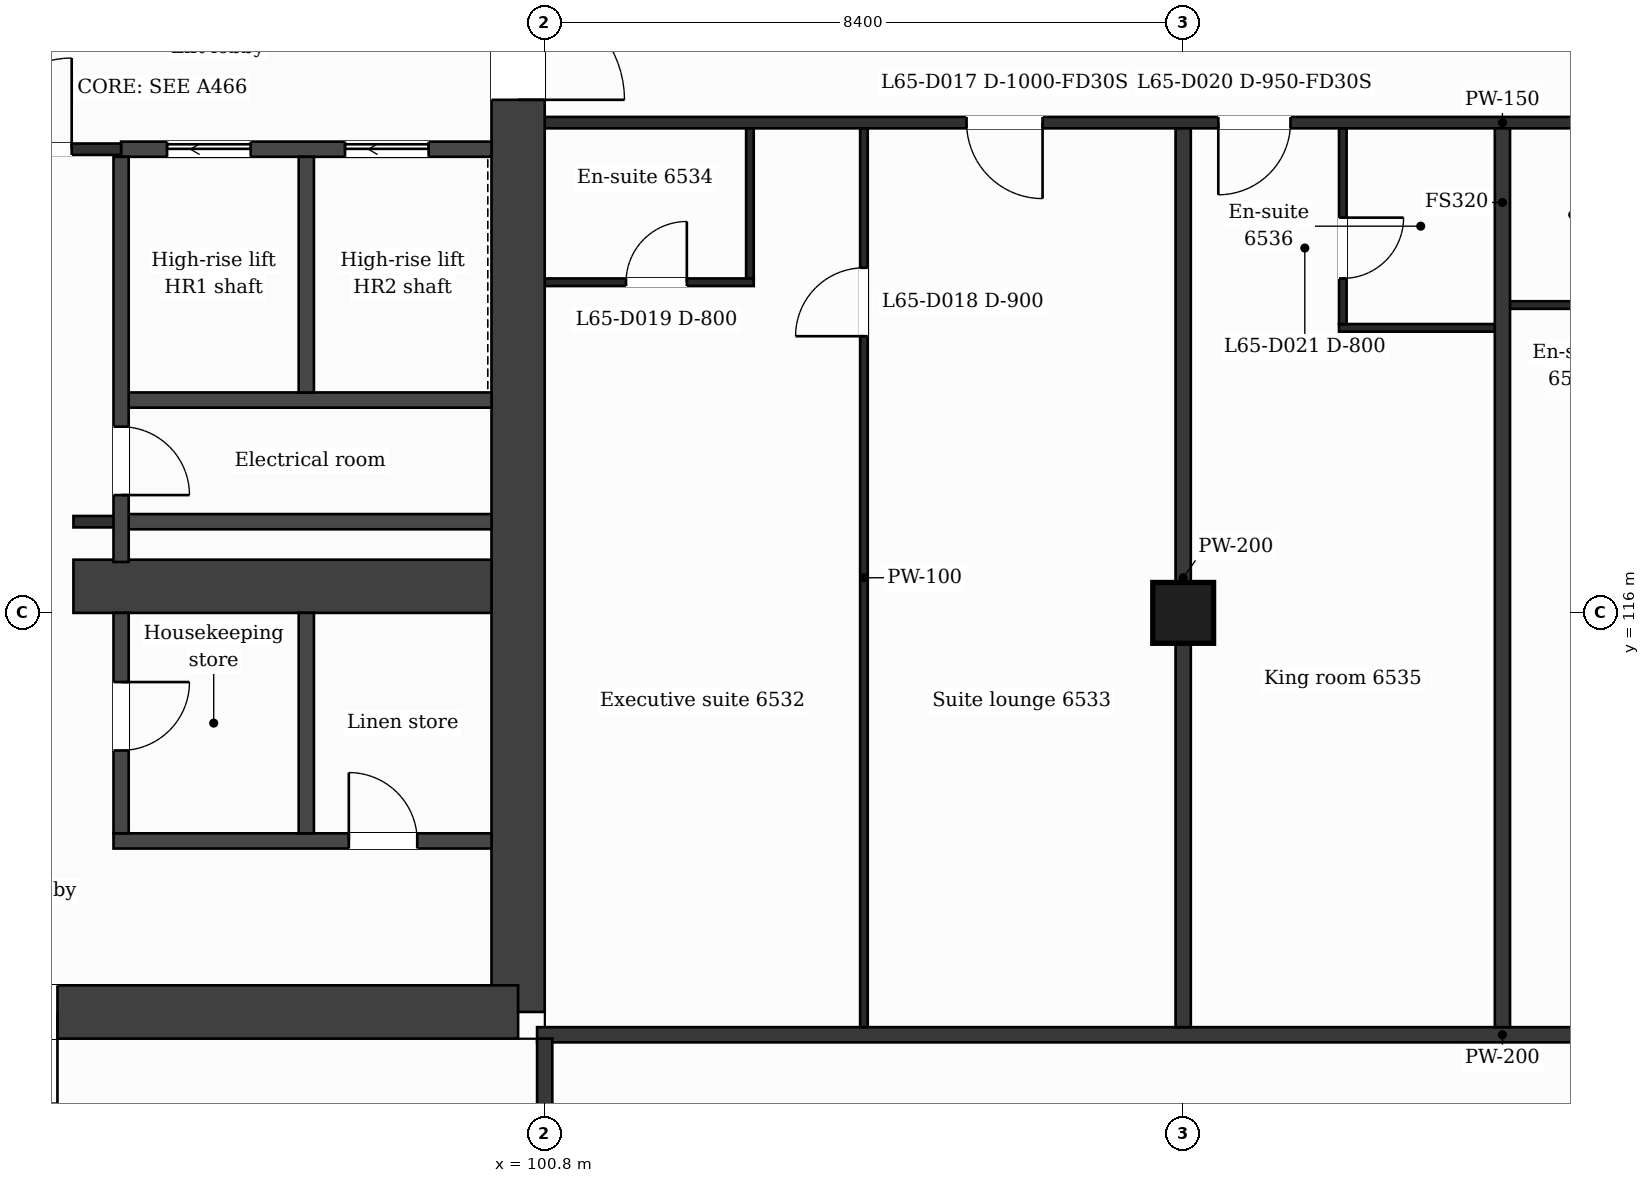
"""IFC4 building model, lengths in metres.
Left out: names, types, materials, properties, quantities, classifications, styles, units other than length and angle.
Written with IfcOpenShell. Run it as: python <this file> out.ifc"""

import sys

from ifc_helpers import new_model, si_unit, direction, frame, frame_2d, origin, origin_2d, place, context, subcontext, project, spatial, rectangle, extrude, element, fill, save


model = new_model("IFC4")
c1 = context("Model", 3, precision=1e-05, world=origin(), true_north=direction((0.0, 1.0)))
c2 = subcontext(c1, "Body", "Model", "MODEL_VIEW")
j1 = project(units=[si_unit("LENGTHUNIT", "METRE"), si_unit("PLANEANGLEUNIT", "RADIAN")], contexts=[c1])
p1 = place(None, origin())
s1 = spatial("IfcSite", under=j1, at=p1, CompositionType="ELEMENT")
p2 = place(p1, origin())
s2 = spatial("IfcBuilding", under=s1, at=p2, CompositionType="ELEMENT")
p3 = place(p2, frame((0.0, 0.0, 270.1)))
s3 = spatial("IfcBuildingStorey", under=s2, at=p3, CompositionType="ELEMENT", Elevation=270.1)
p4 = place(p3, frame((100.45, 132.05, 0.0), z_axis=(0.0, 0.0, 1.0), x_axis=(0.0, -1.0, 0.0)))
e1 = element("IfcWall", 1, at=p4, inside=s3, PredefinedType="SHEAR", context=c2, shape_type="SweptSolid", body=[
    extrude(rectangle(XDim=21.3, YDim=0.7, at=frame_2d((10.65, 0.0))), origin(), (0.0, 0.0, 1.0), 3.7),
])
p5 = place(p4, frame((7.9, 0.0, 0.0)))
e2 = element("IfcOpeningElement", 2, at=p5, cuts=e1, PredefinedType="OPENING", context=c2, shape_type="SweptSolid", body=[
    extrude(rectangle(XDim=1.4, YDim=2.1, at=frame_2d((0.7, 1.05))), frame((0.0, 0.36, 0.0), z_axis=(0.0, -1.0, 0.0), x_axis=(1.0, 0.0, 0.0)), (0.0, 0.0, 1.0), 0.72),
])
p6 = place(p3, frame((100.45, 110.75, 0.0), z_axis=(0.0, 0.0, 1.0), x_axis=(-1.0, 0.0, 0.0)))
e3 = element("IfcWall", 3, at=p6, inside=s3, PredefinedType="SHEAR", context=c2, shape_type="SweptSolid", body=[
    extrude(rectangle(XDim=14.38, YDim=0.7, at=frame_2d((7.19, 0.0))), origin(), (0.0, 0.0, 1.0), 3.7),
])
p7 = place(p6, frame((6.06, 0.0, 0.0)))
e4 = element("IfcOpeningElement", 4, at=p7, cuts=e3, PredefinedType="OPENING", context=c2, shape_type="SweptSolid", body=[
    extrude(rectangle(XDim=1.2, YDim=2.1, at=frame_2d((0.6, 1.05))), frame((0.0, 0.36, 0.0), z_axis=(0.0, -1.0, 0.0), x_axis=(1.0, 0.0, 0.0)), (0.0, 0.0, 1.0), 0.72),
])
p8 = place(p3, frame((94.6, 116.35, 0.0), z_axis=(0.0, 0.0, 1.0), x_axis=(1.0, 0.0, 0.0)))
e5 = element("IfcWall", 5, at=p8, inside=s3, PredefinedType="SHEAR", context=c2, shape_type="SweptSolid", body=[
    extrude(rectangle(XDim=5.5, YDim=0.7, at=frame_2d((2.75, 0.0))), origin(), (0.0, 0.0, 1.0), 3.7),
])
p9 = place(p3, frame((109.2, 116.0, 0.0), z_axis=(0.0, 0.0, 1.0), x_axis=(1.0, 0.0, 0.0)))
e6 = element("IfcColumn", 6, at=p9, inside=s3, PredefinedType="COLUMN", context=c2, shape_type="SweptSolid", body=[
    extrude(rectangle(XDim=0.8, YDim=0.8, at=origin_2d()), origin(), (0.0, 0.0, 1.0), 3.7),
])
p10 = place(p3, frame((100.7, 110.45, 0.0), z_axis=(0.0, 0.0, 1.0), x_axis=(1.0, 0.0, 0.0)))
e7 = element("IfcWall", 7, at=p10, inside=s3, PredefinedType="PARTITIONING", context=c2, shape_type="SweptSolid", body=[
    extrude(rectangle(XDim=25.4, YDim=0.2, at=frame_2d((12.7, 0.0))), origin(), (0.0, 0.0, 1.0), 3.38),
])
p11 = place(p3, frame((95.127, 113.0, 0.0), z_axis=(0.0, 0.0, 1.0), x_axis=(1.0, 0.0, 0.0)))
e8 = element("IfcWall", 8, at=p11, inside=s3, PredefinedType="PARTITIONING", context=c2, shape_type="SweptSolid", body=[
    extrude(rectangle(XDim=4.973, YDim=0.2, at=frame_2d((2.487, 0.0))), origin(), (0.0, 0.0, 1.0), 3.38),
])
p12 = place(p11, frame((3.096, 0.0, 0.0)))
e9 = element("IfcOpeningElement", 9, at=p12, cuts=e8, PredefinedType="OPENING", context=c2, shape_type="SweptSolid", body=[
    extrude(rectangle(XDim=0.9, YDim=2.1, at=frame_2d((0.45, 1.05))), frame((0.0, 0.11, 0.0), z_axis=(0.0, -1.0, 0.0), x_axis=(1.0, 0.0, 0.0)), (0.0, 0.0, 1.0), 0.22),
])
p13 = place(p3, frame((95.227, 117.2, 0.0), z_axis=(0.0, 0.0, 1.0), x_axis=(1.0, 0.0, 0.0)))
e10 = element("IfcWall", 10, at=p13, inside=s3, PredefinedType="PARTITIONING", context=c2, shape_type="SweptSolid", body=[
    extrude(rectangle(XDim=4.873, YDim=0.2, at=frame_2d((2.437, 0.0))), origin(), (0.0, 0.0, 1.0), 3.38),
])
p14 = place(p3, frame((94.6, 117.2, 0.0), z_axis=(0.0, 0.0, 1.0), x_axis=(1.0, 0.0, 0.0)))
e11 = element("IfcWall", 11, at=p14, inside=s3, PredefinedType="PARTITIONING", context=c2, shape_type="SweptSolid", body=[
    extrude(rectangle(XDim=0.627, YDim=0.15, at=frame_2d((0.313, 0.0))), origin(), (0.0, 0.0, 1.0), 3.38),
])
p15 = place(p3, frame((95.227, 118.8, 0.0), z_axis=(0.0, 0.0, 1.0), x_axis=(1.0, 0.0, 0.0)))
e12 = element("IfcWall", 12, at=p15, inside=s3, PredefinedType="PARTITIONING", context=c2, shape_type="SweptSolid", body=[
    extrude(rectangle(XDim=4.873, YDim=0.2, at=frame_2d((2.437, 0.0))), origin(), (0.0, 0.0, 1.0), 3.38),
])
p16 = place(p3, frame((111.25, 119.75, 0.0), z_axis=(0.0, 0.0, 1.0), x_axis=(1.0, 0.0, 0.0)))
e13 = element("IfcWall", 13, at=p16, inside=s3, PredefinedType="PARTITIONING", context=c2, shape_type="SweptSolid", body=[
    extrude(rectangle(XDim=2.15, YDim=0.1, at=frame_2d((1.075, 0.0))), origin(), (0.0, 0.0, 1.0), 3.38),
])
p17 = place(p3, frame((113.4, 120.05, 0.0), z_axis=(0.0, 0.0, 1.0), x_axis=(1.0, 0.0, 0.0)))
e14 = element("IfcWall", 14, at=p17, inside=s3, PredefinedType="PARTITIONING", context=c2, shape_type="SweptSolid", body=[
    extrude(rectangle(XDim=1.85, YDim=0.1, at=frame_2d((0.925, 0.0))), origin(), (0.0, 0.0, 1.0), 3.38),
])
p18 = place(p3, frame((100.8, 120.35, 0.0), z_axis=(0.0, 0.0, 1.0), x_axis=(1.0, 0.0, 0.0)))
e15 = element("IfcWall", 15, at=p18, inside=s3, PredefinedType="PARTITIONING", context=c2, shape_type="SweptSolid", body=[
    extrude(rectangle(XDim=2.75, YDim=0.1, at=frame_2d((1.375, 0.0))), origin(), (0.0, 0.0, 1.0), 3.38),
])
p19 = place(p18, frame((1.07, 0.0, 0.0)))
e16 = element("IfcOpeningElement", 16, at=p19, cuts=e15, PredefinedType="OPENING", context=c2, shape_type="SweptSolid", body=[
    extrude(rectangle(XDim=0.8, YDim=2.1, at=frame_2d((0.4, 1.05))), frame((0.0, 0.06, 0.0), z_axis=(0.0, -1.0, 0.0), x_axis=(1.0, 0.0, 0.0)), (0.0, 0.0, 1.0), 0.12),
])
p20 = place(p3, frame((95.227, 122.1, 0.0), z_axis=(0.0, 0.0, 1.0), x_axis=(1.0, 0.0, 0.0)))
e17 = element("IfcWall", 17, at=p20, inside=s3, PredefinedType="PARTITIONING", context=c2, shape_type="SweptSolid", body=[
    extrude(rectangle(XDim=4.873, YDim=0.2, at=frame_2d((2.437, 0.0))), origin(), (0.0, 0.0, 1.0), 3.38),
])
p21 = place(p20, frame((0.605, 0.0, 0.0)))
e18 = element("IfcOpeningElement", 18, at=p21, cuts=e17, PredefinedType="OPENING", context=c2, shape_type="SweptSolid", body=[
    extrude(rectangle(XDim=1.1, YDim=2.1, at=frame_2d((0.55, 1.05))), frame((0.0, 0.11, 0.0), z_axis=(0.0, -1.0, 0.0), x_axis=(1.0, 0.0, 0.0)), (0.0, 0.0, 1.0), 0.22),
])
p22 = place(p20, frame((2.946, 0.0, 0.0)))
e19 = element("IfcOpeningElement", 19, at=p22, cuts=e17, PredefinedType="OPENING", context=c2, shape_type="SweptSolid", body=[
    extrude(rectangle(XDim=1.1, YDim=2.1, at=frame_2d((0.55, 1.05))), frame((0.0, 0.11, 0.0), z_axis=(0.0, -1.0, 0.0), x_axis=(1.0, 0.0, 0.0)), (0.0, 0.0, 1.0), 0.22),
])
p23 = place(p3, frame((92.827, 122.1, 0.0), z_axis=(0.0, 0.0, 1.0), x_axis=(1.0, 0.0, 0.0)))
e20 = element("IfcWall", 20, at=p23, inside=s3, PredefinedType="PARTITIONING", context=c2, shape_type="SweptSolid", body=[
    extrude(rectangle(XDim=2.4, YDim=0.15, at=frame_2d((1.2, 0.0))), origin(), (0.0, 0.0, 1.0), 3.38),
])
p24 = place(p23, frame((0.55, 0.0, 0.0)))
e21 = element("IfcOpeningElement", 21, at=p24, cuts=e20, PredefinedType="OPENING", context=c2, shape_type="SweptSolid", body=[
    extrude(rectangle(XDim=1.2, YDim=2.1, at=frame_2d((0.6, 1.05))), frame((0.0, 0.085, 0.0), z_axis=(0.0, -1.0, 0.0), x_axis=(1.0, 0.0, 0.0)), (0.0, 0.0, 1.0), 0.17),
])
p25 = place(p3, frame((100.8, 122.45, 0.0), z_axis=(0.0, 0.0, 1.0), x_axis=(1.0, 0.0, 0.0)))
e22 = element("IfcWall", 22, at=p25, inside=s3, PredefinedType="PARTITIONING", context=c2, shape_type="SweptSolid", body=[
    extrude(rectangle(XDim=25.2, YDim=0.15, at=frame_2d((12.6, 0.0))), origin(), (0.0, 0.0, 1.0), 3.38),
])
p26 = place(p25, frame((5.55, 0.0, 0.0)))
e23 = element("IfcOpeningElement", 23, at=p26, cuts=e22, PredefinedType="OPENING", context=c2, shape_type="SweptSolid", body=[
    extrude(rectangle(XDim=1.0, YDim=2.1, at=frame_2d((0.5, 1.05))), frame((0.0, 0.085, 0.0), z_axis=(0.0, -1.0, 0.0), x_axis=(1.0, 0.0, 0.0)), (0.0, 0.0, 1.0), 0.17),
])
p27 = place(p25, frame((8.862, 0.0, 0.0)))
e24 = element("IfcOpeningElement", 24, at=p27, cuts=e22, PredefinedType="OPENING", context=c2, shape_type="SweptSolid", body=[
    extrude(rectangle(XDim=0.95, YDim=2.1, at=frame_2d((0.475, 1.05))), frame((0.0, 0.085, 0.0), z_axis=(0.0, -1.0, 0.0), x_axis=(1.0, 0.0, 0.0)), (0.0, 0.0, 1.0), 0.17),
])
p28 = place(p25, frame((15.2, 0.0, 0.0)))
e25 = element("IfcOpeningElement", 25, at=p28, cuts=e22, PredefinedType="OPENING", context=c2, shape_type="SweptSolid", body=[
    extrude(rectangle(XDim=0.95, YDim=2.1, at=frame_2d((0.475, 1.05))), frame((0.0, 0.085, 0.0), z_axis=(0.0, -1.0, 0.0), x_axis=(1.0, 0.0, 0.0)), (0.0, 0.0, 1.0), 0.17),
])
p29 = place(p25, frame((17.325, 0.0, 0.0)))
e26 = element("IfcOpeningElement", 26, at=p29, cuts=e22, PredefinedType="OPENING", context=c2, shape_type="SweptSolid", body=[
    extrude(rectangle(XDim=1.0, YDim=2.1, at=frame_2d((0.5, 1.05))), frame((0.0, 0.085, 0.0), z_axis=(0.0, -1.0, 0.0), x_axis=(1.0, 0.0, 0.0)), (0.0, 0.0, 1.0), 0.17),
])
p30 = place(p25, frame((23.862, 0.0, 0.0)))
e27 = element("IfcOpeningElement", 27, at=p30, cuts=e22, PredefinedType="OPENING", context=c2, shape_type="SweptSolid", body=[
    extrude(rectangle(XDim=0.95, YDim=2.1, at=frame_2d((0.475, 1.05))), frame((0.0, 0.085, 0.0), z_axis=(0.0, -1.0, 0.0), x_axis=(1.0, 0.0, 0.0)), (0.0, 0.0, 1.0), 0.17),
])
p31 = place(p3, frame((95.227, 113.1, 0.0), z_axis=(0.0, 0.0, 1.0), x_axis=(0.0, 1.0, 0.0)))
e28 = element("IfcWall", 28, at=p31, inside=s3, PredefinedType="PARTITIONING", context=c2, shape_type="SweptSolid", body=[
    extrude(rectangle(XDim=2.9, YDim=0.2, at=frame_2d((1.45, 0.0))), origin(), (0.0, 0.0, 1.0), 3.38),
])
p32 = place(p31, frame((1.09, 0.0, 0.0)))
e29 = element("IfcOpeningElement", 29, at=p32, cuts=e28, PredefinedType="OPENING", context=c2, shape_type="SweptSolid", body=[
    extrude(rectangle(XDim=0.9, YDim=2.1, at=frame_2d((0.45, 1.05))), frame((0.0, 0.11, 0.0), z_axis=(0.0, -1.0, 0.0), x_axis=(1.0, 0.0, 0.0)), (0.0, 0.0, 1.0), 0.22),
])
p33 = place(p3, frame((95.227, 116.67, 0.0), z_axis=(0.0, 0.0, 1.0), x_axis=(0.0, 1.0, 0.0)))
e30 = element("IfcWall", 30, at=p33, inside=s3, PredefinedType="PARTITIONING", context=c2, shape_type="SweptSolid", body=[
    extrude(rectangle(XDim=5.33, YDim=0.2, at=frame_2d((2.665, 0.0))), origin(), (0.0, 0.0, 1.0), 3.38),
])
p34 = place(p33, frame((0.88, 0.0, 0.0)))
e31 = element("IfcOpeningElement", 31, at=p34, cuts=e30, PredefinedType="OPENING", context=c2, shape_type="SweptSolid", body=[
    extrude(rectangle(XDim=0.9, YDim=2.1, at=frame_2d((0.45, 1.05))), frame((0.0, 0.11, 0.0), z_axis=(0.0, -1.0, 0.0), x_axis=(1.0, 0.0, 0.0)), (0.0, 0.0, 1.0), 0.22),
])
p35 = place(p3, frame((97.664, 113.1, 0.0), z_axis=(0.0, 0.0, 1.0), x_axis=(0.0, 1.0, 0.0)))
e32 = element("IfcWall", 32, at=p35, inside=s3, PredefinedType="PARTITIONING", context=c2, shape_type="SweptSolid", body=[
    extrude(rectangle(XDim=2.9, YDim=0.2, at=frame_2d((1.45, 0.0))), origin(), (0.0, 0.0, 1.0), 3.38),
])
p36 = place(p3, frame((97.664, 118.9, 0.0), z_axis=(0.0, 0.0, 1.0), x_axis=(0.0, 1.0, 0.0)))
e33 = element("IfcWall", 33, at=p36, inside=s3, PredefinedType="PARTITIONING", context=c2, shape_type="SweptSolid", body=[
    extrude(rectangle(XDim=3.1, YDim=0.2, at=frame_2d((1.55, 0.0))), origin(), (0.0, 0.0, 1.0), 3.38),
])
p37 = place(p3, frame((100.8, 108.79, 0.0), z_axis=(0.0, 0.0, 1.0), x_axis=(0.0, 1.0, 0.0)))
e34 = element("IfcWall", 34, at=p37, inside=s3, PredefinedType="PARTITIONING", context=c2, shape_type="SweptSolid", body=[
    extrude(rectangle(XDim=1.61, YDim=0.2, at=frame_2d((0.805, 0.0))), origin(), (0.0, 0.0, 1.0), 3.38),
])
p38 = place(p3, frame((103.5, 120.4, 0.0), z_axis=(0.0, 0.0, 1.0), x_axis=(0.0, 1.0, 0.0)))
e35 = element("IfcWall", 35, at=p38, inside=s3, PredefinedType="PARTITIONING", context=c2, shape_type="SweptSolid", body=[
    extrude(rectangle(XDim=1.975, YDim=0.1, at=frame_2d((0.988, 0.0))), origin(), (0.0, 0.0, 1.0), 3.38),
])
p39 = place(p3, frame((105.0, 110.55, 0.0), z_axis=(0.0, 0.0, 1.0), x_axis=(0.0, 1.0, 0.0)))
e36 = element("IfcWall", 36, at=p39, inside=s3, PredefinedType="PARTITIONING", context=c2, shape_type="SweptSolid", body=[
    extrude(rectangle(XDim=11.825, YDim=0.1, at=frame_2d((5.913, 0.0))), origin(), (0.0, 0.0, 1.0), 3.38),
])
p40 = place(p39, frame((9.09, 0.0, 0.0)))
e37 = element("IfcOpeningElement", 37, at=p40, cuts=e36, PredefinedType="OPENING", context=c2, shape_type="SweptSolid", body=[
    extrude(rectangle(XDim=0.9, YDim=2.1, at=frame_2d((0.45, 1.05))), frame((0.0, 0.06, 0.0), z_axis=(0.0, -1.0, 0.0), x_axis=(1.0, 0.0, 0.0)), (0.0, 0.0, 1.0), 0.12),
])
p41 = place(p3, frame((109.2, 110.55, 0.0), z_axis=(0.0, 0.0, 1.0), x_axis=(0.0, 1.0, 0.0)))
e38 = element("IfcWall", 38, at=p41, inside=s3, PredefinedType="PARTITIONING", context=c2, shape_type="SweptSolid", body=[
    extrude(rectangle(XDim=11.825, YDim=0.2, at=frame_2d((5.913, 0.0))), origin(), (0.0, 0.0, 1.0), 3.38),
])
p42 = place(p3, frame((111.3, 119.8, 0.0), z_axis=(0.0, 0.0, 1.0), x_axis=(0.0, 1.0, 0.0)))
e39 = element("IfcWall", 39, at=p42, inside=s3, PredefinedType="PARTITIONING", context=c2, shape_type="SweptSolid", body=[
    extrude(rectangle(XDim=2.575, YDim=0.1, at=frame_2d((1.288, 0.0))), origin(), (0.0, 0.0, 1.0), 3.38),
])
p43 = place(p42, frame((0.6, 0.0, 0.0)))
e40 = element("IfcOpeningElement", 40, at=p43, cuts=e39, PredefinedType="OPENING", context=c2, shape_type="SweptSolid", body=[
    extrude(rectangle(XDim=0.8, YDim=2.1, at=frame_2d((0.4, 1.05))), frame((0.0, 0.06, 0.0), z_axis=(0.0, -1.0, 0.0), x_axis=(1.0, 0.0, 0.0)), (0.0, 0.0, 1.0), 0.12),
])
p44 = place(p3, frame((113.4, 110.55, 0.0), z_axis=(0.0, 0.0, 1.0), x_axis=(0.0, 1.0, 0.0)))
e41 = element("IfcWall", 41, at=p44, inside=s3, PredefinedType="PARTITIONING", context=c2, shape_type="SweptSolid", body=[
    extrude(rectangle(XDim=11.825, YDim=0.2, at=frame_2d((5.913, 0.0))), origin(), (0.0, 0.0, 1.0), 3.38),
])
p45 = place(p24, origin())
e42 = element("IfcDoor", 42, at=p45, inside=s3, OperationType="SINGLE_SWING_RIGHT", PredefinedType="DOOR", context=c2, shape_type="SweptSolid", body=[
    extrude(rectangle(XDim=1.2, YDim=2.1, at=frame_2d((0.6, 1.05))), frame((0.0, 0.025, 0.0), z_axis=(0.0, -1.0, 0.0), x_axis=(1.0, 0.0, 0.0)), (0.0, 0.0, 1.0), 0.05),
])
fill(e21, e42)
p46 = place(p21, origin())
e43 = element("IfcDoor", 43, at=p46, inside=s3, OperationType="SLIDING_TO_LEFT", PredefinedType="DOOR", context=c2, shape_type="SweptSolid", body=[
    extrude(rectangle(XDim=1.1, YDim=2.1, at=frame_2d((0.55, 1.05))), frame((0.0, 0.025, 0.0), z_axis=(0.0, -1.0, 0.0), x_axis=(1.0, 0.0, 0.0)), (0.0, 0.0, 1.0), 0.05),
])
fill(e18, e43)
p47 = place(p22, origin())
e44 = element("IfcDoor", 44, at=p47, inside=s3, OperationType="SLIDING_TO_LEFT", PredefinedType="DOOR", context=c2, shape_type="SweptSolid", body=[
    extrude(rectangle(XDim=1.1, YDim=2.1, at=frame_2d((0.55, 1.05))), frame((0.0, 0.025, 0.0), z_axis=(0.0, -1.0, 0.0), x_axis=(1.0, 0.0, 0.0)), (0.0, 0.0, 1.0), 0.05),
])
fill(e19, e44)
p48 = place(p34, origin())
e45 = element("IfcDoor", 45, at=p48, inside=s3, OperationType="SINGLE_SWING_LEFT", PredefinedType="DOOR", context=c2, shape_type="SweptSolid", body=[
    extrude(rectangle(XDim=0.9, YDim=2.1, at=frame_2d((0.45, 1.05))), frame((0.0, 0.025, 0.0), z_axis=(0.0, -1.0, 0.0), x_axis=(1.0, 0.0, 0.0)), (0.0, 0.0, 1.0), 0.05),
])
fill(e31, e45)
p49 = place(p32, origin())
e46 = element("IfcDoor", 46, at=p49, inside=s3, OperationType="SINGLE_SWING_RIGHT", PredefinedType="DOOR", context=c2, shape_type="SweptSolid", body=[
    extrude(rectangle(XDim=0.9, YDim=2.1, at=frame_2d((0.45, 1.05))), frame((0.0, 0.025, 0.0), z_axis=(0.0, -1.0, 0.0), x_axis=(1.0, 0.0, 0.0)), (0.0, 0.0, 1.0), 0.05),
])
fill(e29, e46)
p50 = place(p12, origin())
e47 = element("IfcDoor", 47, at=p50, inside=s3, OperationType="SINGLE_SWING_LEFT", PredefinedType="DOOR", context=c2, shape_type="SweptSolid", body=[
    extrude(rectangle(XDim=0.9, YDim=2.1, at=frame_2d((0.45, 1.05))), frame((0.0, 0.025, 0.0), z_axis=(0.0, -1.0, 0.0), x_axis=(1.0, 0.0, 0.0)), (0.0, 0.0, 1.0), 0.05),
])
fill(e9, e47)
p51 = place(p26, origin())
e48 = element("IfcDoor", 48, at=p51, inside=s3, OperationType="SINGLE_SWING_RIGHT", PredefinedType="DOOR", context=c2, shape_type="SweptSolid", body=[
    extrude(rectangle(XDim=1.0, YDim=2.1, at=frame_2d((0.5, 1.05))), frame((0.0, 0.025, 0.0), z_axis=(0.0, -1.0, 0.0), x_axis=(1.0, 0.0, 0.0)), (0.0, 0.0, 1.0), 0.05),
])
fill(e23, e48)
p52 = place(p40, origin())
e49 = element("IfcDoor", 49, at=p52, inside=s3, OperationType="SINGLE_SWING_LEFT", PredefinedType="DOOR", context=c2, shape_type="SweptSolid", body=[
    extrude(rectangle(XDim=0.9, YDim=2.1, at=frame_2d((0.45, 1.05))), frame((0.0, 0.025, 0.0), z_axis=(0.0, -1.0, 0.0), x_axis=(1.0, 0.0, 0.0)), (0.0, 0.0, 1.0), 0.05),
])
fill(e37, e49)
p53 = place(p19, origin())
e50 = element("IfcDoor", 50, at=p53, inside=s3, OperationType="SINGLE_SWING_RIGHT", PredefinedType="DOOR", context=c2, shape_type="SweptSolid", body=[
    extrude(rectangle(XDim=0.8, YDim=2.1, at=frame_2d((0.4, 1.05))), frame((0.0, 0.025, 0.0), z_axis=(0.0, -1.0, 0.0), x_axis=(1.0, 0.0, 0.0)), (0.0, 0.0, 1.0), 0.05),
])
fill(e16, e50)
p54 = place(p27, origin())
e51 = element("IfcDoor", 51, at=p54, inside=s3, OperationType="SINGLE_SWING_LEFT", PredefinedType="DOOR", context=c2, shape_type="SweptSolid", body=[
    extrude(rectangle(XDim=0.95, YDim=2.1, at=frame_2d((0.475, 1.05))), frame((0.0, 0.025, 0.0), z_axis=(0.0, -1.0, 0.0), x_axis=(1.0, 0.0, 0.0)), (0.0, 0.0, 1.0), 0.05),
])
fill(e24, e51)
p55 = place(p43, origin())
e52 = element("IfcDoor", 52, at=p55, inside=s3, OperationType="SINGLE_SWING_RIGHT", PredefinedType="DOOR", context=c2, shape_type="SweptSolid", body=[
    extrude(rectangle(XDim=0.8, YDim=2.1, at=frame_2d((0.4, 1.05))), frame((0.0, 0.025, 0.0), z_axis=(0.0, -1.0, 0.0), x_axis=(1.0, 0.0, 0.0)), (0.0, 0.0, 1.0), 0.05),
])
fill(e40, e52)
p56 = place(p7, origin())
e53 = element("IfcDoor", 53, at=p56, inside=s3, OperationType="SINGLE_SWING_LEFT", PredefinedType="DOOR", context=c2, shape_type="SweptSolid", body=[
    extrude(rectangle(XDim=1.2, YDim=2.1, at=frame_2d((0.6, 1.05))), frame((0.0, 0.025, 0.0), z_axis=(0.0, -1.0, 0.0), x_axis=(1.0, 0.0, 0.0)), (0.0, 0.0, 1.0), 0.05),
])
fill(e4, e53)
p57 = place(p5, origin())
e54 = element("IfcDoor", 54, at=p57, inside=s3, OperationType="SINGLE_SWING_RIGHT", PredefinedType="DOOR", context=c2, shape_type="SweptSolid", body=[
    extrude(rectangle(XDim=1.4, YDim=2.1, at=frame_2d((0.7, 1.05))), frame((0.0, 0.025, 0.0), z_axis=(0.0, -1.0, 0.0), x_axis=(1.0, 0.0, 0.0)), (0.0, 0.0, 1.0), 0.05),
])
fill(e2, e54)
save(model, sys.argv[1])
